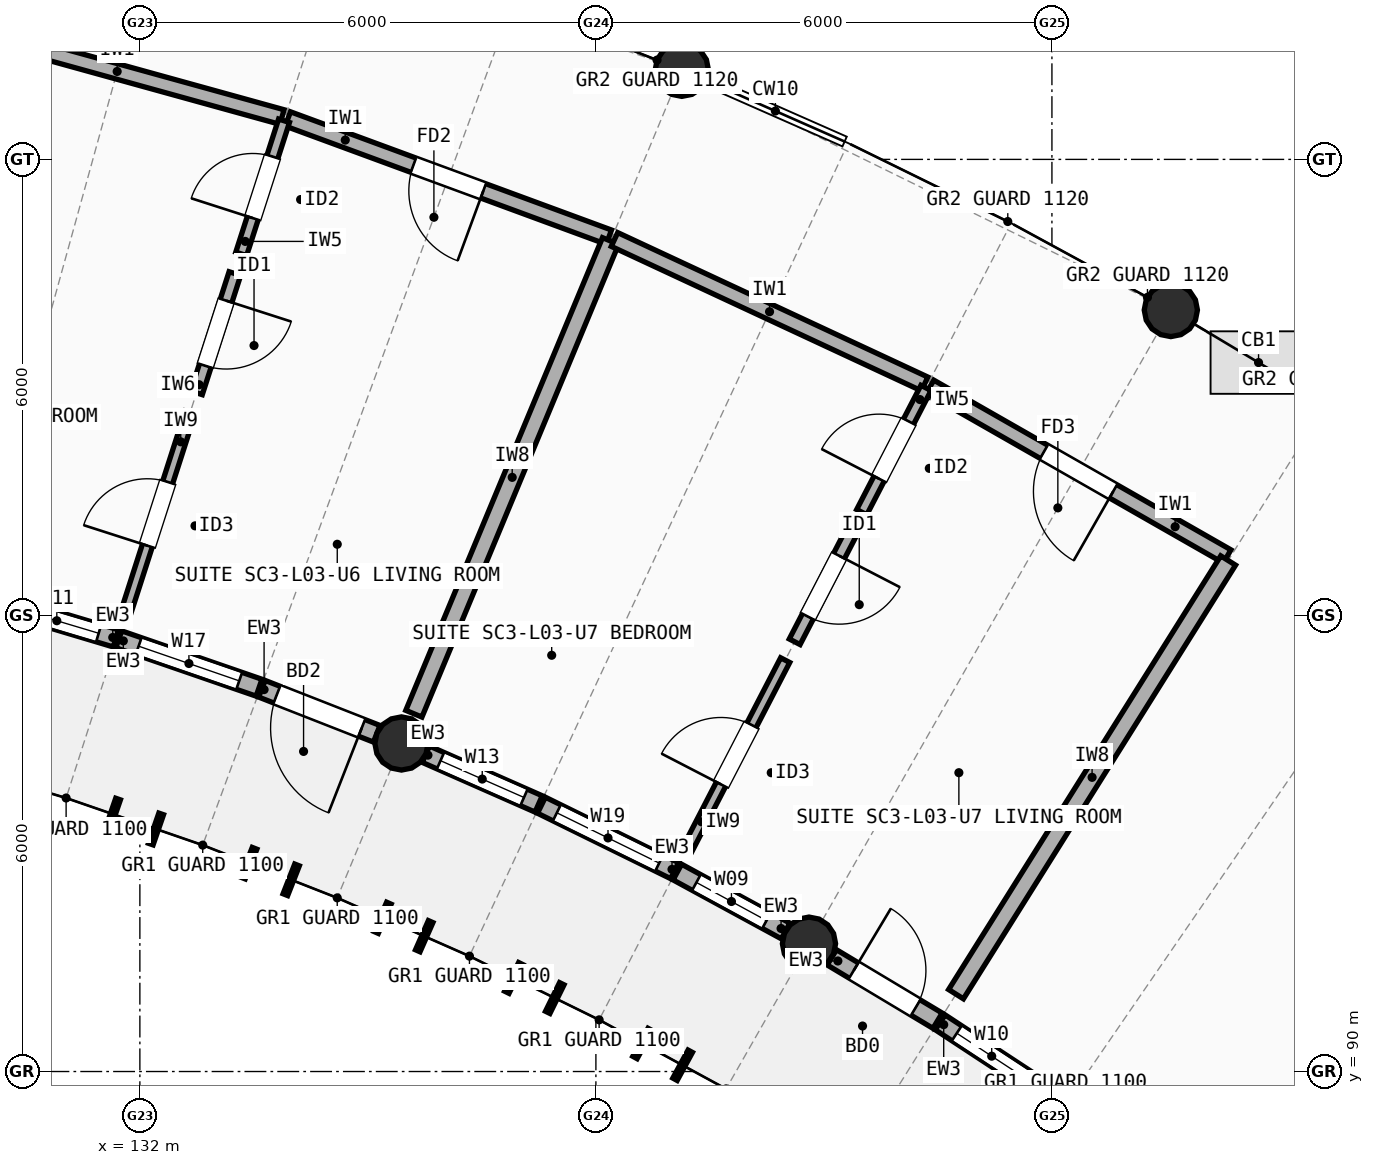
"""IFC4 building model, lengths in metres.
Left out: names, types, materials, properties, quantities, classifications, styles, units other than length and angle.
Written with IfcOpenShell. Run it as: python <this file> out.ifc"""

import sys

from ifc_helpers import new_model, si_unit, direction, frame, frame_2d, origin, origin_2d, place, context, subcontext, project, spatial, rectangle, circle, extrude, element, fill, save


model = new_model("IFC4")
c1 = context("Model", 3, precision=1e-05, world=origin(), true_north=direction((0.0, 1.0)))
c2 = subcontext(c1, "Body", "Model", "MODEL_VIEW")
j1 = project(units=[si_unit("LENGTHUNIT", "METRE"), si_unit("PLANEANGLEUNIT", "RADIAN")], contexts=[c1])
p1 = place(None, origin())
s1 = spatial("IfcSite", under=j1, at=p1, CompositionType="ELEMENT")
p2 = place(p1, origin())
s2 = spatial("IfcBuilding", under=s1, at=p2, CompositionType="ELEMENT")
p3 = place(p2, frame((0.0, 0.0, 10.9)))
s3 = spatial("IfcBuildingStorey", under=s2, at=p3, CompositionType="ELEMENT", Elevation=10.9)
for number, where, z_axis, x_axis in (
    (1, (135.442, 94.316, 0.0), (0.0, 0.0, 1.0), (1.0, 0.0, 0.0)),
    (2, (139.13, 103.179, 0.0), (0.0, 0.0, 1.0), (1.0, 0.0, 0.0)),
    (3, (140.804, 91.682, 0.0), (0.0, 0.0, 1.0), (1.0, 0.0, 0.0)),
    (4, (145.564, 100.018, 0.0), (0.0, 0.0, 1.0), (1.0, 0.0, 0.0)),
    (5, (144.178, 89.564, 0.0), (0.0, 0.0, 1.0), (1.0, 0.0, 0.0)),
):
    element("IfcColumn", number, at=place(p3, frame(where, z_axis=z_axis, x_axis=x_axis)), inside=s3, PredefinedType="COLUMN", context=c2, shape_type="SweptSolid", body=[
        extrude(circle(Radius=0.35, at=origin_2d()), origin(), (0.0, 0.0, 1.0), 2.948),
    ])
p4 = place(p3, frame((130.13, 96.163, 0.0), z_axis=(0.0, 0.0, 1.0), x_axis=(0.958078548486, -0.286505662999, 0.0)))
e6 = element("IfcWall", 6, at=p4, inside=s3, PredefinedType="STANDARD", context=c2, shape_type="SweptSolid", body=[
    extrude(rectangle(XDim=1.623, YDim=0.235, at=frame_2d((0.811, 0.0))), origin(), (0.0, 0.0, 1.0), 2.684),
])
p5 = place(p4, frame((0.236, 0.0, 0.85)))
e7 = element("IfcOpeningElement", 7, at=p5, cuts=e6, PredefinedType="OPENING", context=c2, shape_type="SweptSolid", body=[
    extrude(rectangle(XDim=1.15, YDim=1.45, at=frame_2d((0.575, 0.725))), frame((0.0, 0.127, 0.0), z_axis=(0.0, -1.0, 0.0), x_axis=(1.0, 0.0, 0.0)), (0.0, 0.0, 1.0), 0.255),
])
p6 = place(p3, frame((131.722, 95.686, 0.0), z_axis=(0.0, 0.0, 1.0), x_axis=(0.945368994877, -0.326002244662, 0.0)))
e8 = element("IfcWall", 8, at=p6, inside=s3, PredefinedType="STANDARD", context=c2, shape_type="SweptSolid", body=[
    extrude(rectangle(XDim=1.952, YDim=0.235, at=frame_2d((0.976, 0.0))), origin(), (0.0, 0.0, 1.0), 2.684),
])
p7 = place(p6, frame((0.276, 0.0, 0.85)))
e9 = element("IfcOpeningElement", 9, at=p7, cuts=e8, PredefinedType="OPENING", context=c2, shape_type="SweptSolid", body=[
    extrude(rectangle(XDim=1.4, YDim=1.5, at=frame_2d((0.7, 0.75))), frame((0.0, 0.127, 0.0), z_axis=(0.0, -1.0, 0.0), x_axis=(1.0, 0.0, 0.0)), (0.0, 0.0, 1.0), 0.255),
])
p8 = place(p3, frame((133.606, 95.036, 0.0), z_axis=(0.0, 0.0, 1.0), x_axis=(0.931038371221, -0.364921294684, 0.0)))
e10 = element("IfcWall", 10, at=p8, inside=s3, PredefinedType="STANDARD", context=c2, shape_type="SweptSolid", body=[
    extrude(rectangle(XDim=1.622, YDim=0.235, at=frame_2d((0.811, 0.0))), origin(), (0.0, 0.0, 1.0), 2.684),
])
p9 = place(p8, frame((0.211, 0.0, 0.0)))
e11 = element("IfcOpeningElement", 11, at=p9, cuts=e10, PredefinedType="OPENING", context=c2, shape_type="SweptSolid", body=[
    extrude(rectangle(XDim=1.2, YDim=2.15, at=frame_2d((0.6, 1.075))), frame((0.0, 0.127, 0.0), z_axis=(0.0, -1.0, 0.0), x_axis=(1.0, 0.0, 0.0)), (0.0, 0.0, 1.0), 0.255),
])
p10 = place(p3, frame((135.762, 94.175, 0.0), z_axis=(0.0, 0.0, 1.0), x_axis=(0.915073009016, -0.403288219727, 0.0)))
e12 = element("IfcWall", 12, at=p10, inside=s3, PredefinedType="STANDARD", context=c2, shape_type="SweptSolid", body=[
    extrude(rectangle(XDim=1.622, YDim=0.235, at=frame_2d((0.811, 0.0))), origin(), (0.0, 0.0, 1.0), 2.684),
])
p11 = place(p10, frame((0.211, 0.0, 0.85)))
e13 = element("IfcOpeningElement", 13, at=p11, cuts=e12, PredefinedType="OPENING", context=c2, shape_type="SweptSolid", body=[
    extrude(rectangle(XDim=1.2, YDim=1.45, at=frame_2d((0.6, 0.725))), frame((0.0, 0.127, 0.0), z_axis=(0.0, -1.0, 0.0), x_axis=(1.0, 0.0, 0.0)), (0.0, 0.0, 1.0), 0.255),
])
p12 = place(p3, frame((137.283, 93.503, 0.0), z_axis=(0.0, 0.0, 1.0), x_axis=(0.897531751182, -0.44094983345, 0.0)))
e14 = element("IfcWall", 14, at=p12, inside=s3, PredefinedType="STANDARD", context=c2, shape_type="SweptSolid", body=[
    extrude(rectangle(XDim=1.952, YDim=0.235, at=frame_2d((0.976, 0.0))), origin(), (0.0, 0.0, 1.0), 2.684),
])
p13 = place(p12, frame((0.226, 0.0, 0.85)))
e15 = element("IfcOpeningElement", 15, at=p13, cuts=e14, PredefinedType="OPENING", context=c2, shape_type="SweptSolid", body=[
    extrude(rectangle(XDim=1.5, YDim=1.5, at=frame_2d((0.75, 0.75))), frame((0.0, 0.127, 0.0), z_axis=(0.0, -1.0, 0.0), x_axis=(1.0, 0.0, 0.0)), (0.0, 0.0, 1.0), 0.255),
])
p14 = place(p3, frame((139.071, 92.624, 0.0), z_axis=(0.0, 0.0, 1.0), x_axis=(0.878452871629, -0.477828999044, 0.0)))
e16 = element("IfcWall", 16, at=p14, inside=s3, PredefinedType="STANDARD", context=c2, shape_type="SweptSolid", body=[
    extrude(rectangle(XDim=1.622, YDim=0.235, at=frame_2d((0.811, 0.0))), origin(), (0.0, 0.0, 1.0), 2.684),
])
p15 = place(p14, frame((0.286, 0.0, 0.85)))
e17 = element("IfcOpeningElement", 17, at=p15, cuts=e16, PredefinedType="OPENING", context=c2, shape_type="SweptSolid", body=[
    extrude(rectangle(XDim=1.05, YDim=1.35, at=frame_2d((0.525, 0.675))), frame((0.0, 0.127, 0.0), z_axis=(0.0, -1.0, 0.0), x_axis=(1.0, 0.0, 0.0)), (0.0, 0.0, 1.0), 0.255),
])
p16 = place(p3, frame((141.104, 91.502, 0.0), z_axis=(0.0, 0.0, 1.0), x_axis=(0.85782472272, -0.513942355805, 0.0)))
e18 = element("IfcWall", 18, at=p16, inside=s3, PredefinedType="STANDARD", context=c2, shape_type="SweptSolid", body=[
    extrude(rectangle(XDim=1.622, YDim=0.235, at=frame_2d((0.811, 0.0))), origin(), (0.0, 0.0, 1.0), 2.684),
])
p17 = place(p16, frame((0.336, 0.0, 0.0)))
e19 = element("IfcOpeningElement", 19, at=p17, cuts=e18, PredefinedType="OPENING", context=c2, shape_type="SweptSolid", body=[
    extrude(rectangle(XDim=0.95, YDim=2.12, at=frame_2d((0.475, 1.06))), frame((0.0, 0.127, 0.0), z_axis=(0.0, -1.0, 0.0), x_axis=(1.0, 0.0, 0.0)), (0.0, 0.0, 1.0), 0.255),
])
p18 = place(p3, frame((142.53, 90.647, 0.0), z_axis=(0.0, 0.0, 1.0), x_axis=(0.835873156341, -0.548922641644, 0.0)))
e20 = element("IfcWall", 20, at=p18, inside=s3, PredefinedType="STANDARD", context=c2, shape_type="SweptSolid", body=[
    extrude(rectangle(XDim=1.623, YDim=0.235, at=frame_2d((0.811, 0.0))), origin(), (0.0, 0.0, 1.0), 2.684),
])
p19 = place(p18, frame((0.261, 0.0, 0.85)))
e21 = element("IfcOpeningElement", 21, at=p19, cuts=e20, PredefinedType="OPENING", context=c2, shape_type="SweptSolid", body=[
    extrude(rectangle(XDim=1.1, YDim=1.45, at=frame_2d((0.55, 0.725))), frame((0.0, 0.127, 0.0), z_axis=(0.0, -1.0, 0.0), x_axis=(1.0, 0.0, 0.0)), (0.0, 0.0, 1.0), 0.255),
])
p20 = place(p3, frame((129.532, 103.757, 0.0), z_axis=(0.0, 0.0, 1.0), x_axis=(0.963830390038, -0.266516377055, 0.0)))
e22 = element("IfcWall", 22, at=p20, inside=s3, PredefinedType="SOLIDWALL", context=c2, shape_type="SweptSolid", body=[
    extrude(rectangle(XDim=4.501, YDim=0.2, at=frame_2d((2.251, 0.0))), origin(), (0.0, 0.0, 1.0), 2.762),
])
p21 = place(p3, frame((133.947, 102.533, 0.0), z_axis=(0.0, 0.0, 1.0), x_axis=(0.93839218154, -0.345572154006, 0.0)))
e23 = element("IfcWall", 23, at=p21, inside=s3, PredefinedType="SOLIDWALL", context=c2, shape_type="SweptSolid", body=[
    extrude(rectangle(XDim=4.502, YDim=0.2, at=frame_2d((2.251, 0.0))), origin(), (0.0, 0.0, 1.0), 2.742),
])
p22 = place(p21, frame((1.761, 0.0, 0.0)))
e24 = element("IfcOpeningElement", 24, at=p22, cuts=e23, PredefinedType="OPENING", context=c2, shape_type="SweptSolid", body=[
    extrude(rectangle(XDim=0.98, YDim=2.15, at=frame_2d((0.49, 1.075))), frame((0.0, 0.11, 0.0), z_axis=(0.0, -1.0, 0.0), x_axis=(1.0, 0.0, 0.0)), (0.0, 0.0, 1.0), 0.22),
])
p23 = place(p3, frame((131.804, 96.005, 0.0), z_axis=(0.0, 0.0, 1.0), x_axis=(0.306243449584, 0.951953228676, 0.0)))
e25 = element("IfcWall", 25, at=p23, inside=s3, PredefinedType="PARTITIONING", context=c2, shape_type="SweptSolid", body=[
    extrude(rectangle(XDim=2.8, YDim=0.135, at=frame_2d((1.4, 0.0))), origin(), (0.0, 0.0, 1.0), 2.722),
])
p24 = place(p23, frame((0.96, 0.0, 0.0)))
e26 = element("IfcOpeningElement", 26, at=p24, cuts=e25, PredefinedType="OPENING", context=c2, shape_type="SweptSolid", body=[
    extrude(rectangle(XDim=0.88, YDim=2.1, at=frame_2d((0.44, 1.05))), frame((0.0, 0.077, 0.0), z_axis=(0.0, -1.0, 0.0), x_axis=(1.0, 0.0, 0.0)), (0.0, 0.0, 1.0), 0.155),
])
p25 = place(p3, frame((132.745, 98.929, 0.0), z_axis=(0.0, 0.0, 1.0), x_axis=(0.306388026226, 0.95190670624, 0.0)))
e27 = element("IfcWall", 27, at=p25, inside=s3, PredefinedType="PLUMBINGWALL", context=c2, shape_type="SweptSolid", body=[
    extrude(rectangle(XDim=1.648, YDim=0.16, at=frame_2d((0.824, 0.0))), origin(), (0.0, 0.0, 1.0), 2.722),
])
p26 = place(p25, frame((0.374, 0.0, 0.0)))
e28 = element("IfcOpeningElement", 28, at=p26, cuts=e27, PredefinedType="OPENING", context=c2, shape_type="SweptSolid", body=[
    extrude(rectangle(XDim=0.9, YDim=2.1, at=frame_2d((0.45, 1.05))), frame((0.0, 0.09, 0.0), z_axis=(0.0, -1.0, 0.0), x_axis=(1.0, 0.0, 0.0)), (0.0, 0.0, 1.0), 0.18),
])
p27 = place(p3, frame((133.333, 100.757, 0.0), z_axis=(0.0, 0.0, 1.0), x_axis=(0.306258297612, 0.951948451936, 0.0)))
e29 = element("IfcWall", 29, at=p27, inside=s3, PredefinedType="PARTITIONING", context=c2, shape_type="SweptSolid", body=[
    extrude(rectangle(XDim=1.84, YDim=0.15, at=frame_2d((0.92, 0.0))), origin(), (0.0, 0.0, 1.0), 2.722),
])
p28 = place(p27, frame((0.495, 0.0, 0.0)))
e30 = element("IfcOpeningElement", 30, at=p28, cuts=e29, PredefinedType="OPENING", context=c2, shape_type="SweptSolid", body=[
    extrude(rectangle(XDim=0.85, YDim=2.1, at=frame_2d((0.425, 1.05))), frame((0.0, 0.085, 0.0), z_axis=(0.0, -1.0, 0.0), x_axis=(1.0, 0.0, 0.0)), (0.0, 0.0, 1.0), 0.17),
])
p29 = place(p3, frame((135.605, 94.707, 0.0), z_axis=(0.0, 0.0, 1.0), x_axis=(0.384190705314, 0.923253758157, 0.0)))
e31 = element("IfcWall", 31, at=p29, inside=s3, PredefinedType="SOLIDWALL", context=c2, shape_type="SweptSolid", body=[
    extrude(rectangle(XDim=6.736, YDim=0.23, at=frame_2d((3.368, 0.0))), origin(), (0.0, 0.0, 1.0), 2.762),
])
p30 = place(p3, frame((138.245, 100.946, 0.0), z_axis=(0.0, 0.0, 1.0), x_axis=(0.906512639591, -0.422178675755, 0.0)))
e32 = element("IfcWall", 32, at=p30, inside=s3, PredefinedType="SOLIDWALL", context=c2, shape_type="SweptSolid", body=[
    extrude(rectangle(XDim=4.501, YDim=0.2, at=frame_2d((2.251, 0.0))), origin(), (0.0, 0.0, 1.0), 2.722),
])
p31 = place(p3, frame((142.396, 99.009, 0.0), z_axis=(0.0, 0.0, 1.0), x_axis=(0.868376606973, -0.495905301909, 0.0)))
e33 = element("IfcWall", 33, at=p31, inside=s3, PredefinedType="SOLIDWALL", context=c2, shape_type="SweptSolid", body=[
    extrude(rectangle(XDim=4.502, YDim=0.2, at=frame_2d((2.251, 0.0))), origin(), (0.0, 0.0, 1.0), 2.762),
])
p32 = place(p31, frame((1.726, 0.0, 0.0)))
e34 = element("IfcOpeningElement", 34, at=p32, cuts=e33, PredefinedType="OPENING", context=c2, shape_type="SweptSolid", body=[
    extrude(rectangle(XDim=1.05, YDim=2.15, at=frame_2d((0.525, 1.075))), frame((0.0, 0.11, 0.0), z_axis=(0.0, -1.0, 0.0), x_axis=(1.0, 0.0, 0.0)), (0.0, 0.0, 1.0), 0.22),
])
p33 = place(p3, frame((139.204, 92.925, 0.0), z_axis=(0.0, 0.0, 1.0), x_axis=(0.459449012792, 0.888204145816, 0.0)))
e35 = element("IfcWall", 35, at=p33, inside=s3, PredefinedType="PARTITIONING", context=c2, shape_type="SweptSolid", body=[
    extrude(rectangle(XDim=2.8, YDim=0.135, at=frame_2d((1.4, 0.0))), origin(), (0.0, 0.0, 1.0), 2.742),
])
p34 = place(p33, frame((0.96, 0.0, 0.0)))
e36 = element("IfcOpeningElement", 36, at=p34, cuts=e35, PredefinedType="OPENING", context=c2, shape_type="SweptSolid", body=[
    extrude(rectangle(XDim=0.88, YDim=2.1, at=frame_2d((0.44, 1.05))), frame((0.0, 0.077, 0.0), z_axis=(0.0, -1.0, 0.0), x_axis=(1.0, 0.0, 0.0)), (0.0, 0.0, 1.0), 0.155),
])
p35 = place(p3, frame((140.615, 95.654, 0.0), z_axis=(0.0, 0.0, 1.0), x_axis=(0.459495453195, 0.888180121649, 0.0)))
e37 = element("IfcWall", 37, at=p35, inside=s3, PredefinedType="PLUMBINGWALL", context=c2, shape_type="SweptSolid", body=[
    extrude(rectangle(XDim=1.648, YDim=0.16, at=frame_2d((0.824, 0.0))), origin(), (0.0, 0.0, 1.0), 2.742),
])
p36 = place(p35, frame((0.374, 0.0, 0.0)))
e38 = element("IfcOpeningElement", 38, at=p36, cuts=e37, PredefinedType="OPENING", context=c2, shape_type="SweptSolid", body=[
    extrude(rectangle(XDim=0.9, YDim=2.1, at=frame_2d((0.45, 1.05))), frame((0.0, 0.09, 0.0), z_axis=(0.0, -1.0, 0.0), x_axis=(1.0, 0.0, 0.0)), (0.0, 0.0, 1.0), 0.18),
])
p37 = place(p3, frame((141.498, 97.359, 0.0), z_axis=(0.0, 0.0, 1.0), x_axis=(0.459379600499, 0.888240047873, 0.0)))
e39 = element("IfcWall", 39, at=p37, inside=s3, PredefinedType="PARTITIONING", context=c2, shape_type="SweptSolid", body=[
    extrude(rectangle(XDim=1.84, YDim=0.15, at=frame_2d((0.92, 0.0))), origin(), (0.0, 0.0, 1.0), 2.742),
])
p38 = place(p37, frame((0.495, 0.0, 0.0)))
e40 = element("IfcOpeningElement", 40, at=p38, cuts=e39, PredefinedType="OPENING", context=c2, shape_type="SweptSolid", body=[
    extrude(rectangle(XDim=0.85, YDim=2.1, at=frame_2d((0.425, 1.05))), frame((0.0, 0.085, 0.0), z_axis=(0.0, -1.0, 0.0), x_axis=(1.0, 0.0, 0.0)), (0.0, 0.0, 1.0), 0.17),
])
p39 = place(p3, frame((142.738, 91.017, 0.0), z_axis=(0.0, 0.0, 1.0), x_axis=(0.531512997039, 0.847050136638, 0.0)))
e41 = element("IfcWall", 41, at=p39, inside=s3, PredefinedType="SOLIDWALL", context=c2, shape_type="SweptSolid", body=[
    extrude(rectangle(XDim=6.736, YDim=0.23, at=frame_2d((3.368, 0.0))), origin(), (0.0, 0.0, 1.0), 2.722),
])
p40 = place(p5, origin())
e42 = element("IfcWindow", 42, at=p40, inside=s3, PartitioningType="SINGLE_PANEL", PredefinedType="WINDOW", context=c2, shape_type="SweptSolid", body=[
    extrude(rectangle(XDim=1.15, YDim=1.45, at=frame_2d((0.575, 0.725))), frame((0.0, 0.03, 0.0), z_axis=(0.0, -1.0, 0.0), x_axis=(1.0, 0.0, 0.0)), (0.0, 0.0, 1.0), 0.06),
])
fill(e7, e42)
p41 = place(p7, origin())
e43 = element("IfcWindow", 43, at=p41, inside=s3, PartitioningType="SINGLE_PANEL", PredefinedType="WINDOW", context=c2, shape_type="SweptSolid", body=[
    extrude(rectangle(XDim=1.4, YDim=1.5, at=frame_2d((0.7, 0.75))), frame((0.0, 0.03, 0.0), z_axis=(0.0, -1.0, 0.0), x_axis=(1.0, 0.0, 0.0)), (0.0, 0.0, 1.0), 0.06),
])
fill(e9, e43)
p42 = place(p9, frame((1.2, 0.0, 0.0), z_axis=(0.0, 0.0, 1.0), x_axis=(-1.0, 0.0, 0.0)))
e44 = element("IfcDoor", 44, at=p42, inside=s3, OperationType="SINGLE_SWING_RIGHT", PredefinedType="DOOR", context=c2, shape_type="SweptSolid", body=[
    extrude(rectangle(XDim=1.2, YDim=2.15, at=frame_2d((0.6, 1.075))), frame((0.0, 0.025, 0.0), z_axis=(0.0, -1.0, 0.0), x_axis=(1.0, 0.0, 0.0)), (0.0, 0.0, 1.0), 0.05),
])
fill(e11, e44)
p43 = place(p11, origin())
e45 = element("IfcWindow", 45, at=p43, inside=s3, PartitioningType="SINGLE_PANEL", PredefinedType="WINDOW", context=c2, shape_type="SweptSolid", body=[
    extrude(rectangle(XDim=1.2, YDim=1.45, at=frame_2d((0.6, 0.725))), frame((0.0, 0.03, 0.0), z_axis=(0.0, -1.0, 0.0), x_axis=(1.0, 0.0, 0.0)), (0.0, 0.0, 1.0), 0.06),
])
fill(e13, e45)
p44 = place(p13, origin())
e46 = element("IfcWindow", 46, at=p44, inside=s3, PartitioningType="SINGLE_PANEL", PredefinedType="WINDOW", context=c2, shape_type="SweptSolid", body=[
    extrude(rectangle(XDim=1.5, YDim=1.5, at=frame_2d((0.75, 0.75))), frame((0.0, 0.03, 0.0), z_axis=(0.0, -1.0, 0.0), x_axis=(1.0, 0.0, 0.0)), (0.0, 0.0, 1.0), 0.06),
])
fill(e15, e46)
p45 = place(p15, origin())
e47 = element("IfcWindow", 47, at=p45, inside=s3, PartitioningType="SINGLE_PANEL", PredefinedType="WINDOW", context=c2, shape_type="SweptSolid", body=[
    extrude(rectangle(XDim=1.05, YDim=1.35, at=frame_2d((0.525, 0.675))), frame((0.0, 0.03, 0.0), z_axis=(0.0, -1.0, 0.0), x_axis=(1.0, 0.0, 0.0)), (0.0, 0.0, 1.0), 0.06),
])
fill(e17, e47)
p46 = place(p17, frame((0.95, 0.0, 0.0), z_axis=(0.0, 0.0, 1.0), x_axis=(-1.0, 0.0, 0.0)))
e48 = element("IfcDoor", 48, at=p46, inside=s3, OperationType="SINGLE_SWING_LEFT", PredefinedType="DOOR", context=c2, shape_type="SweptSolid", body=[
    extrude(rectangle(XDim=0.95, YDim=2.12, at=frame_2d((0.475, 1.06))), frame((0.0, 0.025, 0.0), z_axis=(0.0, -1.0, 0.0), x_axis=(1.0, 0.0, 0.0)), (0.0, 0.0, 1.0), 0.05),
])
fill(e19, e48)
p47 = place(p19, origin())
e49 = element("IfcWindow", 49, at=p47, inside=s3, PartitioningType="SINGLE_PANEL", PredefinedType="WINDOW", context=c2, shape_type="SweptSolid", body=[
    extrude(rectangle(XDim=1.1, YDim=1.45, at=frame_2d((0.55, 0.725))), frame((0.0, 0.03, 0.0), z_axis=(0.0, -1.0, 0.0), x_axis=(1.0, 0.0, 0.0)), (0.0, 0.0, 1.0), 0.06),
])
fill(e21, e49)
p48 = place(p22, origin())
e50 = element("IfcDoor", 50, at=p48, inside=s3, OperationType="SINGLE_SWING_RIGHT", PredefinedType="DOOR", context=c2, shape_type="SweptSolid", body=[
    extrude(rectangle(XDim=0.98, YDim=2.15, at=frame_2d((0.49, 1.075))), frame((0.0, 0.025, 0.0), z_axis=(0.0, -1.0, 0.0), x_axis=(1.0, 0.0, 0.0)), (0.0, 0.0, 1.0), 0.05),
])
fill(e24, e50)
p49 = place(p24, origin())
e51 = element("IfcDoor", 51, at=p49, inside=s3, OperationType="SINGLE_SWING_LEFT", PredefinedType="DOOR", context=c2, shape_type="SweptSolid", body=[
    extrude(rectangle(XDim=0.88, YDim=2.1, at=frame_2d((0.44, 1.05))), frame((0.0, 0.025, 0.0), z_axis=(0.0, -1.0, 0.0), x_axis=(1.0, 0.0, 0.0)), (0.0, 0.0, 1.0), 0.05),
])
fill(e26, e51)
p50 = place(p26, origin())
e52 = element("IfcDoor", 52, at=p50, inside=s3, OperationType="SINGLE_SWING_RIGHT", PredefinedType="DOOR", context=c2, shape_type="SweptSolid", body=[
    extrude(rectangle(XDim=0.9, YDim=2.1, at=frame_2d((0.45, 1.05))), frame((0.0, 0.025, 0.0), z_axis=(0.0, -1.0, 0.0), x_axis=(1.0, 0.0, 0.0)), (0.0, 0.0, 1.0), 0.05),
])
fill(e28, e52)
p51 = place(p28, origin())
e53 = element("IfcDoor", 53, at=p51, inside=s3, OperationType="SINGLE_SWING_LEFT", PredefinedType="DOOR", context=c2, shape_type="SweptSolid", body=[
    extrude(rectangle(XDim=0.85, YDim=2.1, at=frame_2d((0.425, 1.05))), frame((0.0, 0.025, 0.0), z_axis=(0.0, -1.0, 0.0), x_axis=(1.0, 0.0, 0.0)), (0.0, 0.0, 1.0), 0.05),
])
fill(e30, e53)
p52 = place(p32, origin())
e54 = element("IfcDoor", 54, at=p52, inside=s3, OperationType="SINGLE_SWING_RIGHT", PredefinedType="DOOR", context=c2, shape_type="SweptSolid", body=[
    extrude(rectangle(XDim=1.05, YDim=2.15, at=frame_2d((0.525, 1.075))), frame((0.0, 0.025, 0.0), z_axis=(0.0, -1.0, 0.0), x_axis=(1.0, 0.0, 0.0)), (0.0, 0.0, 1.0), 0.05),
])
fill(e34, e54)
p53 = place(p34, origin())
e55 = element("IfcDoor", 55, at=p53, inside=s3, OperationType="SINGLE_SWING_LEFT", PredefinedType="DOOR", context=c2, shape_type="SweptSolid", body=[
    extrude(rectangle(XDim=0.88, YDim=2.1, at=frame_2d((0.44, 1.05))), frame((0.0, 0.025, 0.0), z_axis=(0.0, -1.0, 0.0), x_axis=(1.0, 0.0, 0.0)), (0.0, 0.0, 1.0), 0.05),
])
fill(e36, e55)
p54 = place(p36, origin())
e56 = element("IfcDoor", 56, at=p54, inside=s3, OperationType="SINGLE_SWING_RIGHT", PredefinedType="DOOR", context=c2, shape_type="SweptSolid", body=[
    extrude(rectangle(XDim=0.9, YDim=2.1, at=frame_2d((0.45, 1.05))), frame((0.0, 0.025, 0.0), z_axis=(0.0, -1.0, 0.0), x_axis=(1.0, 0.0, 0.0)), (0.0, 0.0, 1.0), 0.05),
])
fill(e38, e56)
p55 = place(p38, origin())
e57 = element("IfcDoor", 57, at=p55, inside=s3, OperationType="SINGLE_SWING_LEFT", PredefinedType="DOOR", context=c2, shape_type="SweptSolid", body=[
    extrude(rectangle(XDim=0.85, YDim=2.1, at=frame_2d((0.425, 1.05))), frame((0.0, 0.025, 0.0), z_axis=(0.0, -1.0, 0.0), x_axis=(1.0, 0.0, 0.0)), (0.0, 0.0, 1.0), 0.05),
])
fill(e40, e57)
save(model, sys.argv[1])
